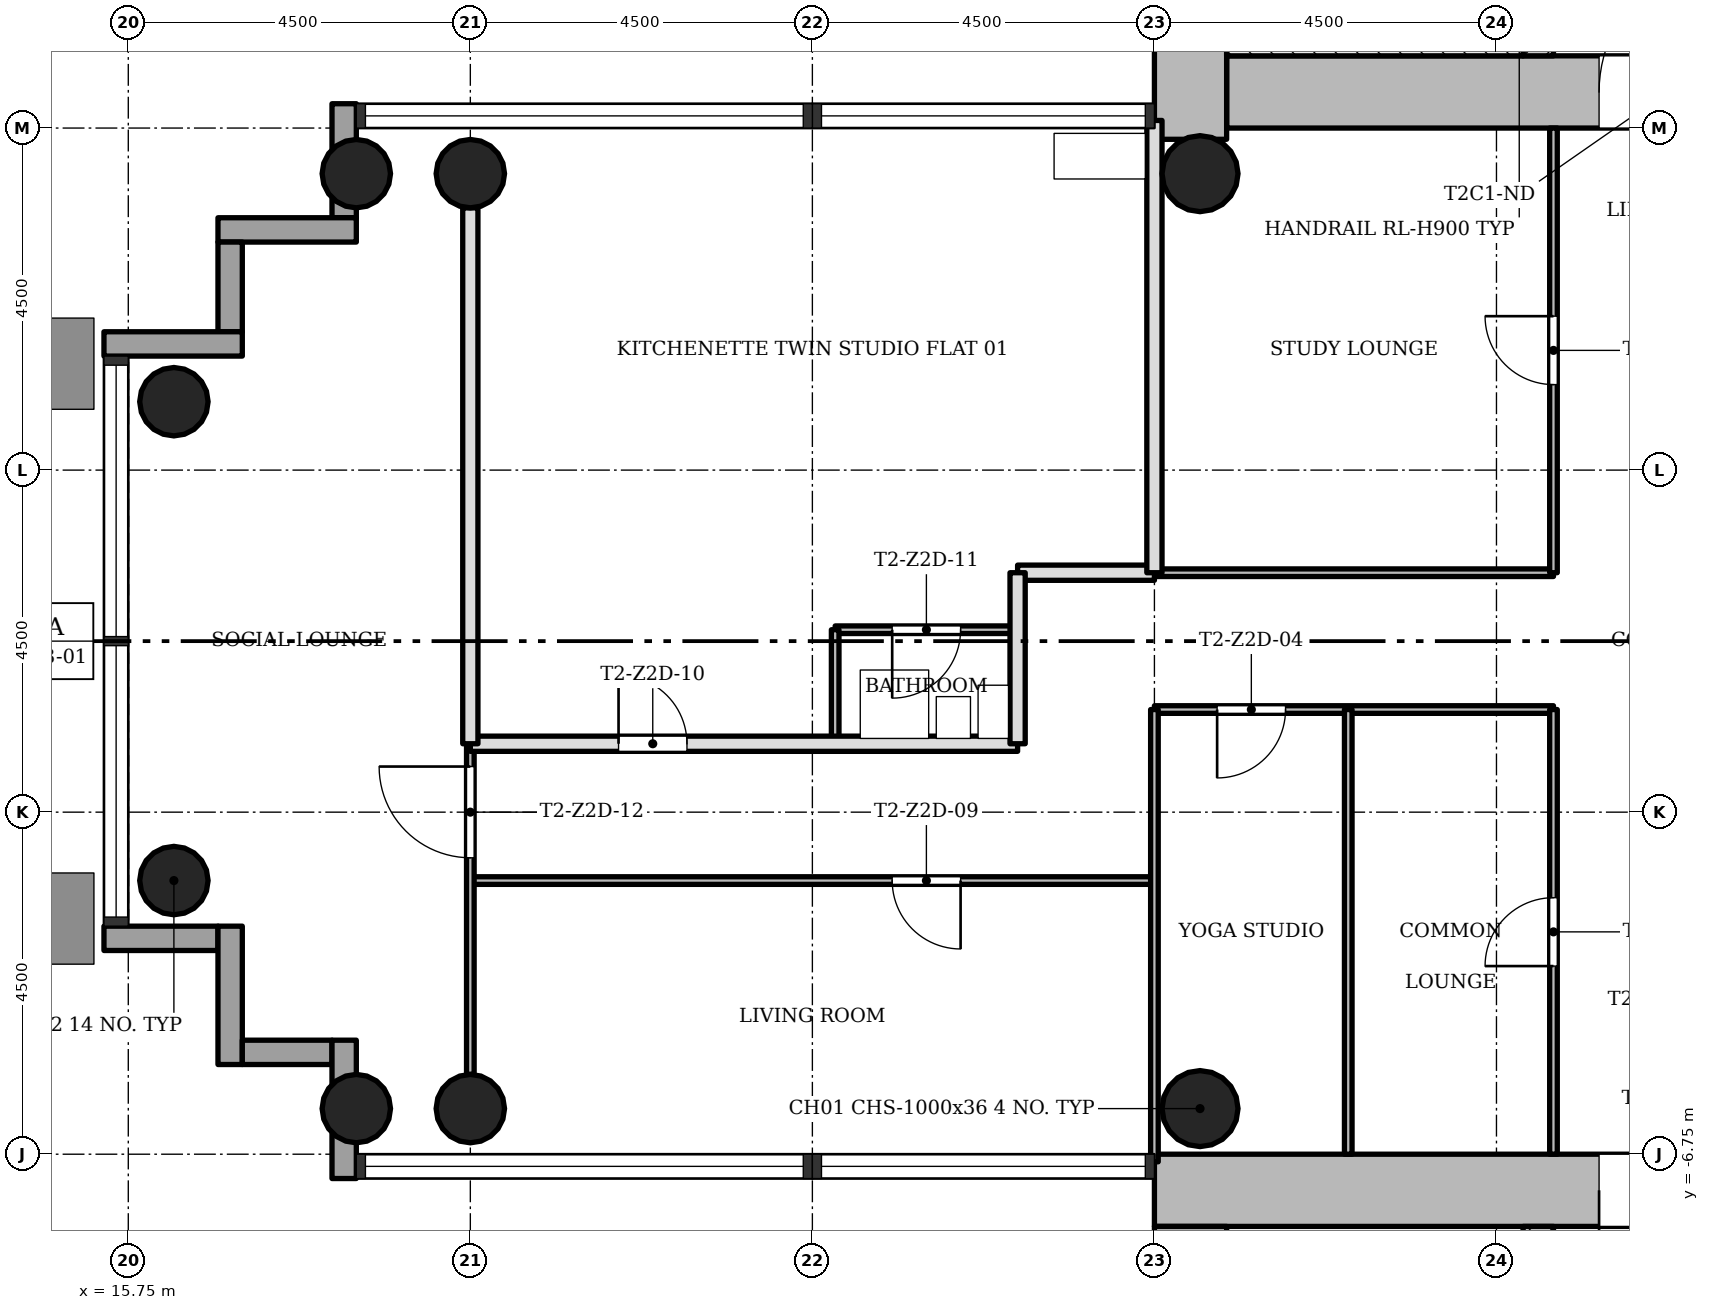
"""IFC4 building model, lengths in metres.
Left out: names, types, materials, properties, quantities, classifications, styles, units other than length and angle.
Written with IfcOpenShell. Run it as: python <this file> out.ifc"""

import sys

from ifc_helpers import new_model, si_unit, direction, frame, frame_2d, origin, origin_2d, place, context, subcontext, project, spatial, rectangle, hollow_circle, extrude, element, fill, save


model = new_model("IFC4")
c1 = context("Model", 3, precision=1e-05, world=origin(), true_north=direction((0.0, 1.0)))
c2 = subcontext(c1, "Body", "Model", "MODEL_VIEW")
j1 = project(units=[si_unit("LENGTHUNIT", "METRE"), si_unit("PLANEANGLEUNIT", "RADIAN")], contexts=[c1])
p1 = place(None, origin())
s1 = spatial("IfcSite", under=j1, at=p1, CompositionType="ELEMENT")
p2 = place(p1, origin())
s2 = spatial("IfcBuilding", under=s1, at=p2, CompositionType="ELEMENT")
p3 = place(p2, frame((0.0, 0.0, 120.8)))
s3 = spatial("IfcBuildingStorey", under=s2, at=p3, CompositionType="ELEMENT", Elevation=120.8)
p4 = place(p3, frame((30.2, 7.225, 0.0), z_axis=(0.0, 0.0, 1.0), x_axis=(1.0, 0.0, 0.0)))
e1 = element("IfcWall", 1, at=p4, inside=s3, PredefinedType="SHEAR", context=c2, shape_type="SweptSolid", body=[
    extrude(rectangle(XDim=12.55, YDim=0.95, at=frame_2d((6.275, 0.0))), origin(), (0.0, 0.0, 1.0), 3.4),
])
p5 = place(p4, frame((4.9, 0.0, 0.0)))
e2 = element("IfcOpeningElement", 2, at=p5, cuts=e1, PredefinedType="OPENING", context=c2, shape_type="SweptSolid", body=[
    extrude(rectangle(XDim=1.8, YDim=2.1, at=frame_2d((0.9, 1.05))), frame((0.0, 0.485, 0.0), z_axis=(0.0, -1.0, 0.0), x_axis=(1.0, 0.0, 0.0)), (0.0, 0.0, 1.0), 0.97),
])
p6 = place(p3, frame((29.725, 15.298, 0.0), z_axis=(0.0, 0.0, 1.0), x_axis=(0.0, -1.0, 0.0)))
e3 = element("IfcWall", 3, at=p6, inside=s3, PredefinedType="SHEAR", context=c2, shape_type="SweptSolid", body=[
    extrude(rectangle(XDim=8.696, YDim=0.95, at=frame_2d((4.348, 0.0))), origin(), (0.0, 0.0, 1.0), 3.4),
])
p7 = place(p3, frame((34.3, 7.7, 0.0), z_axis=(0.0, 0.0, 1.0), x_axis=(0.0, 1.0, 0.0)))
e4 = element("IfcWall", 4, at=p7, inside=s3, PredefinedType="SHEAR", context=c2, shape_type="SweptSolid", body=[
    extrude(rectangle(XDim=7.1, YDim=0.4, at=frame_2d((3.55, 0.0))), origin(), (0.0, 0.0, 1.0), 3.4),
])
p8 = place(p7, frame((0.7, 0.0, 0.0)))
e5 = element("IfcOpeningElement", 5, at=p8, cuts=e4, PredefinedType="OPENING", context=c2, shape_type="SweptSolid", body=[
    extrude(rectangle(XDim=0.9, YDim=2.1, at=frame_2d((0.45, 1.05))), frame((0.0, 0.21, 0.0), z_axis=(0.0, -1.0, 0.0), x_axis=(1.0, 0.0, 0.0)), (0.0, 0.0, 1.0), 0.42),
])
p9 = place(p3, frame((41.8, -7.225, 0.0), z_axis=(0.0, 0.0, 1.0), x_axis=(-1.0, 0.0, 0.0)))
e6 = element("IfcWall", 6, at=p9, inside=s3, PredefinedType="SHEAR", context=c2, shape_type="SweptSolid", body=[
    extrude(rectangle(XDim=12.55, YDim=0.95, at=frame_2d((6.275, 0.0))), origin(), (0.0, 0.0, 1.0), 3.4),
])
p10 = place(p9, frame((4.9, 0.0, 0.0)))
e7 = element("IfcOpeningElement", 7, at=p10, cuts=e6, PredefinedType="OPENING", context=c2, shape_type="SweptSolid", body=[
    extrude(rectangle(XDim=1.8, YDim=2.1, at=frame_2d((0.9, 1.05))), frame((0.0, 0.485, 0.0), z_axis=(0.0, -1.0, 0.0), x_axis=(1.0, 0.0, 0.0)), (0.0, 0.0, 1.0), 0.97),
])
p11 = place(p3, frame((29.725, -7.7, 0.0), z_axis=(0.0, 0.0, 1.0), x_axis=(0.0, -1.0, 0.0)))
e8 = element("IfcWall", 8, at=p11, inside=s3, PredefinedType="SHEAR", context=c2, shape_type="SweptSolid", body=[
    extrude(rectangle(XDim=8.05, YDim=0.95, at=frame_2d((4.025, 0.0))), origin(), (0.0, 0.0, 1.0), 3.4),
])
p12 = place(p3, frame((34.3, -14.8, 0.0), z_axis=(0.0, 0.0, 1.0), x_axis=(0.0, 1.0, 0.0)))
e9 = element("IfcWall", 9, at=p12, inside=s3, PredefinedType="SHEAR", context=c2, shape_type="SweptSolid", body=[
    extrude(rectangle(XDim=7.1, YDim=0.4, at=frame_2d((3.55, 0.0))), origin(), (0.0, 0.0, 1.0), 3.4),
])
p13 = place(p12, frame((5.2, 0.0, 0.0)))
e10 = element("IfcOpeningElement", 10, at=p13, cuts=e9, PredefinedType="OPENING", context=c2, shape_type="SweptSolid", body=[
    extrude(rectangle(XDim=1.1, YDim=2.1, at=frame_2d((0.55, 1.05))), frame((0.0, 0.21, 0.0), z_axis=(0.0, -1.0, 0.0), x_axis=(1.0, 0.0, 0.0)), (0.0, 0.0, 1.0), 0.42),
])
for number, where, z_axis, x_axis in (
    (11, (20.25, 6.15, 0.0), (0.0, 0.0, 1.0), (1.0, 0.0, 0.0)),
    (12, (20.25, -6.15, 0.0), (0.0, 0.0, 1.0), (1.0, 0.0, 0.0)),
    (13, (18.75, 6.15, 0.0), (0.0, 0.0, 1.0), (1.0, 0.0, 0.0)),
    (14, (18.75, -6.15, 0.0), (0.0, 0.0, 1.0), (1.0, 0.0, 0.0)),
    (15, (16.35, 3.15, 0.0), (0.0, 0.0, 1.0), (1.0, 0.0, 0.0)),
    (16, (16.35, -3.15, 0.0), (0.0, 0.0, 1.0), (1.0, 0.0, 0.0)),
):
    element("IfcColumn", number, at=place(p3, frame(where, z_axis=z_axis, x_axis=x_axis)), inside=s3, PredefinedType="COLUMN", context=c2, shape_type="SweptSolid", body=[
        extrude(hollow_circle(Radius=0.45, WallThickness=0.032, at=origin_2d()), origin(), (0.0, 0.0, 1.0), 3.4),
    ])
for number, where, z_axis, x_axis in (
    (17, (29.85, 6.15, 0.0), (0.0, 0.0, 1.0), (1.0, 0.0, 0.0)),
    (18, (29.85, -6.15, 0.0), (0.0, 0.0, 1.0), (1.0, 0.0, 0.0)),
):
    element("IfcColumn", number, at=place(p3, frame(where, z_axis=z_axis, x_axis=x_axis)), inside=s3, PredefinedType="COLUMN", context=c2, shape_type="SweptSolid", body=[
        extrude(hollow_circle(Radius=0.5, WallThickness=0.036, at=origin_2d()), origin(), (0.0, 0.0, 1.0), 3.4),
    ])
p14 = place(p3, frame((18.59, 7.07, -0.3), z_axis=(0.0, 0.0, 1.0), x_axis=(0.0, -1.0, 0.0)))
e19 = element("IfcWall", 19, at=p14, inside=s3, PredefinedType="STANDARD", context=c2, shape_type="SweptSolid", body=[
    extrude(rectangle(XDim=1.5, YDim=0.32, at=frame_2d((0.75, 0.0))), origin(), (0.0, 0.0, 1.0), 3.4),
])
p15 = place(p3, frame((18.75, 5.41, -0.3), z_axis=(0.0, 0.0, 1.0), x_axis=(-1.0, 0.0, 0.0)))
e20 = element("IfcWall", 20, at=p15, inside=s3, PredefinedType="STANDARD", context=c2, shape_type="SweptSolid", body=[
    extrude(rectangle(XDim=1.82, YDim=0.32, at=frame_2d((0.91, 0.0))), origin(), (0.0, 0.0, 1.0), 3.4),
])
p16 = place(p3, frame((17.09, 5.25, -0.3), z_axis=(0.0, 0.0, 1.0), x_axis=(0.0, -1.0, 0.0)))
e21 = element("IfcWall", 21, at=p16, inside=s3, PredefinedType="STANDARD", context=c2, shape_type="SweptSolid", body=[
    extrude(rectangle(XDim=1.18, YDim=0.32, at=frame_2d((0.59, 0.0))), origin(), (0.0, 0.0, 1.0), 3.4),
])
p17 = place(p3, frame((17.25, 3.91, -0.3), z_axis=(0.0, 0.0, 1.0), x_axis=(-1.0, 0.0, 0.0)))
e22 = element("IfcWall", 22, at=p17, inside=s3, PredefinedType="STANDARD", context=c2, shape_type="SweptSolid", body=[
    extrude(rectangle(XDim=1.82, YDim=0.32, at=frame_2d((0.91, 0.0))), origin(), (0.0, 0.0, 1.0), 3.4),
])
p18 = place(p3, frame((15.43, -3.91, -0.3), z_axis=(0.0, 0.0, 1.0), x_axis=(1.0, 0.0, 0.0)))
e23 = element("IfcWall", 23, at=p18, inside=s3, PredefinedType="STANDARD", context=c2, shape_type="SweptSolid", body=[
    extrude(rectangle(XDim=1.5, YDim=0.32, at=frame_2d((0.75, 0.0))), origin(), (0.0, 0.0, 1.0), 3.4),
])
p19 = place(p3, frame((17.09, -3.75, -0.3), z_axis=(0.0, 0.0, 1.0), x_axis=(0.0, -1.0, 0.0)))
e24 = element("IfcWall", 24, at=p19, inside=s3, PredefinedType="STANDARD", context=c2, shape_type="SweptSolid", body=[
    extrude(rectangle(XDim=1.82, YDim=0.32, at=frame_2d((0.91, 0.0))), origin(), (0.0, 0.0, 1.0), 3.4),
])
p20 = place(p3, frame((17.25, -5.41, -0.3), z_axis=(0.0, 0.0, 1.0), x_axis=(1.0, 0.0, 0.0)))
e25 = element("IfcWall", 25, at=p20, inside=s3, PredefinedType="STANDARD", context=c2, shape_type="SweptSolid", body=[
    extrude(rectangle(XDim=1.18, YDim=0.32, at=frame_2d((0.59, 0.0))), origin(), (0.0, 0.0, 1.0), 3.4),
])
p21 = place(p3, frame((18.59, -5.25, -0.3), z_axis=(0.0, 0.0, 1.0), x_axis=(0.0, -1.0, 0.0)))
e26 = element("IfcWall", 26, at=p21, inside=s3, PredefinedType="STANDARD", context=c2, shape_type="SweptSolid", body=[
    extrude(rectangle(XDim=1.82, YDim=0.32, at=frame_2d((0.91, 0.0))), origin(), (0.0, 0.0, 1.0), 3.4),
])
p22 = place(p3, frame((29.25, -3.15, 0.0), z_axis=(0.0, 0.0, 1.0), x_axis=(-1.0, 0.0, 0.0)))
e27 = element("IfcWall", 27, at=p22, inside=s3, PredefinedType="PARTITIONING", context=c2, shape_type="SweptSolid", body=[
    extrude(rectangle(XDim=9.0, YDim=0.1, at=frame_2d((4.5, 0.0))), origin(), (0.0, 0.0, 1.0), 3.0),
])
p23 = place(p22, frame((2.55, 0.0, 0.0)))
e28 = element("IfcOpeningElement", 28, at=p23, cuts=e27, PredefinedType="OPENING", context=c2, shape_type="SweptSolid", body=[
    extrude(rectangle(XDim=0.9, YDim=2.1, at=frame_2d((0.45, 1.05))), frame((0.0, 0.06, 0.0), z_axis=(0.0, -1.0, 0.0), x_axis=(1.0, 0.0, 0.0)), (0.0, 0.0, 1.0), 0.12),
])
p24 = place(p3, frame((27.45, -1.35, 0.0), z_axis=(0.0, 0.0, 1.0), x_axis=(-1.0, 0.0, 0.0)))
e29 = element("IfcWall", 29, at=p24, inside=s3, PredefinedType="SOLIDWALL", context=c2, shape_type="SweptSolid", body=[
    extrude(rectangle(XDim=7.2, YDim=0.2, at=frame_2d((3.6, 0.0))), origin(), (0.0, 0.0, 1.0), 3.0),
])
p25 = place(p24, frame((4.35, 0.0, 0.0)))
e30 = element("IfcOpeningElement", 30, at=p25, cuts=e29, PredefinedType="OPENING", context=c2, shape_type="SweptSolid", body=[
    extrude(rectangle(XDim=0.9, YDim=2.1, at=frame_2d((0.45, 1.05))), frame((0.0, 0.11, 0.0), z_axis=(0.0, -1.0, 0.0), x_axis=(1.0, 0.0, 0.0)), (0.0, 0.0, 1.0), 0.22),
])
p26 = place(p3, frame((34.5, -0.9, 0.0), z_axis=(0.0, 0.0, 1.0), x_axis=(-1.0, 0.0, 0.0)))
e31 = element("IfcWall", 31, at=p26, inside=s3, PredefinedType="PARTITIONING", context=c2, shape_type="SweptSolid", body=[
    extrude(rectangle(XDim=5.25, YDim=0.1, at=frame_2d((2.625, 0.0))), origin(), (0.0, 0.0, 1.0), 3.0),
])
p27 = place(p26, frame((3.525, 0.0, 0.0)))
e32 = element("IfcOpeningElement", 32, at=p27, cuts=e31, PredefinedType="OPENING", context=c2, shape_type="SweptSolid", body=[
    extrude(rectangle(XDim=0.9, YDim=2.1, at=frame_2d((0.45, 1.05))), frame((0.0, 0.06, 0.0), z_axis=(0.0, -1.0, 0.0), x_axis=(1.0, 0.0, 0.0)), (0.0, 0.0, 1.0), 0.12),
])
p28 = place(p3, frame((27.45, 0.15, 0.0), z_axis=(0.0, 0.0, 1.0), x_axis=(-1.0, 0.0, 0.0)))
e33 = element("IfcWall", 33, at=p28, inside=s3, PredefinedType="PARTITIONING", context=c2, shape_type="SweptSolid", body=[
    extrude(rectangle(XDim=2.4, YDim=0.1, at=frame_2d((1.2, 0.0))), origin(), (0.0, 0.0, 1.0), 3.0),
])
p29 = place(p28, frame((0.75, 0.0, 0.0)))
e34 = element("IfcOpeningElement", 34, at=p29, cuts=e33, PredefinedType="OPENING", context=c2, shape_type="SweptSolid", body=[
    extrude(rectangle(XDim=0.9, YDim=2.1, at=frame_2d((0.45, 1.05))), frame((0.0, 0.06, 0.0), z_axis=(0.0, -1.0, 0.0), x_axis=(1.0, 0.0, 0.0)), (0.0, 0.0, 1.0), 0.12),
])
p30 = place(p3, frame((34.5, 0.9, 0.0), z_axis=(0.0, 0.0, 1.0), x_axis=(-1.0, 0.0, 0.0)))
e35 = element("IfcWall", 35, at=p30, inside=s3, PredefinedType="PARTITIONING", context=c2, shape_type="SweptSolid", body=[
    extrude(rectangle(XDim=5.25, YDim=0.1, at=frame_2d((2.625, 0.0))), origin(), (0.0, 0.0, 1.0), 3.0),
])
p31 = place(p3, frame((29.25, 0.9, 0.0), z_axis=(0.0, 0.0, 1.0), x_axis=(-1.0, 0.0, 0.0)))
e36 = element("IfcWall", 36, at=p31, inside=s3, PredefinedType="SOLIDWALL", context=c2, shape_type="SweptSolid", body=[
    extrude(rectangle(XDim=1.8, YDim=0.2, at=frame_2d((0.9, 0.0))), origin(), (0.0, 0.0, 1.0), 3.0),
])
p32 = place(p3, frame((34.5, -6.75, 0.0), z_axis=(0.0, 0.0, 1.0), x_axis=(0.0, 1.0, 0.0)))
e37 = element("IfcWall", 37, at=p32, inside=s3, PredefinedType="PARTITIONING", context=c2, shape_type="SweptSolid", body=[
    extrude(rectangle(XDim=5.85, YDim=0.1, at=frame_2d((2.925, 0.0))), origin(), (0.0, 0.0, 1.0), 3.0),
])
p33 = place(p32, frame((2.475, 0.0, 0.0)))
e38 = element("IfcOpeningElement", 38, at=p33, cuts=e37, PredefinedType="OPENING", context=c2, shape_type="SweptSolid", body=[
    extrude(rectangle(XDim=0.9, YDim=2.1, at=frame_2d((0.45, 1.05))), frame((0.0, 0.06, 0.0), z_axis=(0.0, -1.0, 0.0), x_axis=(1.0, 0.0, 0.0)), (0.0, 0.0, 1.0), 0.12),
])
p34 = place(p3, frame((34.5, 0.9, 0.0), z_axis=(0.0, 0.0, 1.0), x_axis=(0.0, 1.0, 0.0)))
e39 = element("IfcWall", 39, at=p34, inside=s3, PredefinedType="PARTITIONING", context=c2, shape_type="SweptSolid", body=[
    extrude(rectangle(XDim=5.85, YDim=0.1, at=frame_2d((2.925, 0.0))), origin(), (0.0, 0.0, 1.0), 3.0),
])
p35 = place(p34, frame((2.475, 0.0, 0.0)))
e40 = element("IfcOpeningElement", 40, at=p35, cuts=e39, PredefinedType="OPENING", context=c2, shape_type="SweptSolid", body=[
    extrude(rectangle(XDim=0.9, YDim=2.1, at=frame_2d((0.45, 1.05))), frame((0.0, 0.06, 0.0), z_axis=(0.0, -1.0, 0.0), x_axis=(1.0, 0.0, 0.0)), (0.0, 0.0, 1.0), 0.12),
])
p36 = place(p3, frame((31.8, -6.75, 0.0), z_axis=(0.0, 0.0, 1.0), x_axis=(0.0, 1.0, 0.0)))
e41 = element("IfcWall", 41, at=p36, inside=s3, PredefinedType="PARTITIONING", context=c2, shape_type="SweptSolid", body=[
    extrude(rectangle(XDim=5.85, YDim=0.1, at=frame_2d((2.925, 0.0))), origin(), (0.0, 0.0, 1.0), 3.0),
])
p37 = place(p3, frame((29.25, -6.85, 0.0), z_axis=(0.0, 0.0, 1.0), x_axis=(0.0, 1.0, 0.0)))
e42 = element("IfcWall", 42, at=p37, inside=s3, PredefinedType="PARTITIONING", context=c2, shape_type="SweptSolid", body=[
    extrude(rectangle(XDim=5.95, YDim=0.1, at=frame_2d((2.975, 0.0))), origin(), (0.0, 0.0, 1.0), 3.0),
])
p38 = place(p3, frame((29.25, 0.9, 0.0), z_axis=(0.0, 0.0, 1.0), x_axis=(0.0, 1.0, 0.0)))
e43 = element("IfcWall", 43, at=p38, inside=s3, PredefinedType="SOLIDWALL", context=c2, shape_type="SweptSolid", body=[
    extrude(rectangle(XDim=5.95, YDim=0.2, at=frame_2d((2.975, 0.0))), origin(), (0.0, 0.0, 1.0), 3.0),
])
p39 = place(p3, frame((27.45, -1.35, 0.0), z_axis=(0.0, 0.0, 1.0), x_axis=(0.0, 1.0, 0.0)))
e44 = element("IfcWall", 44, at=p39, inside=s3, PredefinedType="SOLIDWALL", context=c2, shape_type="SweptSolid", body=[
    extrude(rectangle(XDim=2.25, YDim=0.2, at=frame_2d((1.125, 0.0))), origin(), (0.0, 0.0, 1.0), 3.0),
])
p40 = place(p3, frame((25.05, -1.35, 0.0), z_axis=(0.0, 0.0, 1.0), x_axis=(0.0, 1.0, 0.0)))
e45 = element("IfcWall", 45, at=p40, inside=s3, PredefinedType="PARTITIONING", context=c2, shape_type="SweptSolid", body=[
    extrude(rectangle(XDim=1.5, YDim=0.1, at=frame_2d((0.75, 0.0))), origin(), (0.0, 0.0, 1.0), 3.0),
])
p41 = place(p3, frame((20.25, -5.7, 0.0), z_axis=(0.0, 0.0, 1.0), x_axis=(0.0, 1.0, 0.0)))
e46 = element("IfcWall", 46, at=p41, inside=s3, PredefinedType="PARTITIONING", context=c2, shape_type="SweptSolid", body=[
    extrude(rectangle(XDim=4.35, YDim=0.1, at=frame_2d((2.175, 0.0))), origin(), (0.0, 0.0, 1.0), 3.0),
])
p42 = place(p41, frame((2.85, 0.0, 0.0)))
e47 = element("IfcOpeningElement", 47, at=p42, cuts=e46, PredefinedType="OPENING", context=c2, shape_type="SweptSolid", body=[
    extrude(rectangle(XDim=1.2, YDim=2.1, at=frame_2d((0.6, 1.05))), frame((0.0, 0.06, 0.0), z_axis=(0.0, -1.0, 0.0), x_axis=(1.0, 0.0, 0.0)), (0.0, 0.0, 1.0), 0.12),
])
p43 = place(p3, frame((20.25, -1.35, 0.0), z_axis=(0.0, 0.0, 1.0), x_axis=(0.0, 1.0, 0.0)))
e48 = element("IfcWall", 48, at=p43, inside=s3, PredefinedType="SOLIDWALL", context=c2, shape_type="SweptSolid", body=[
    extrude(rectangle(XDim=7.05, YDim=0.2, at=frame_2d((3.525, 0.0))), origin(), (0.0, 0.0, 1.0), 3.0),
])
p44 = place(p3, frame((34.1, 7.825, 0.0), z_axis=(0.0, 0.0, 1.0), x_axis=(-1.0, 0.0, 0.0)))
e49 = element("IfcWall", 49, at=p44, inside=s3, PredefinedType="SHEAR", context=c2, shape_type="SweptSolid", body=[
    extrude(rectangle(XDim=3.9, YDim=0.25, at=frame_2d((1.95, 0.0))), origin(), (0.0, 0.0, 1.0), 3.4),
])
p45 = place(p35, origin())
e50 = element("IfcDoor", 50, at=p45, inside=s3, OperationType="SINGLE_SWING_LEFT", PredefinedType="DOOR", context=c2, shape_type="SweptSolid", body=[
    extrude(rectangle(XDim=0.9, YDim=2.1, at=frame_2d((0.45, 1.05))), frame((0.0, 0.025, 0.0), z_axis=(0.0, -1.0, 0.0), x_axis=(1.0, 0.0, 0.0)), (0.0, 0.0, 1.0), 0.05),
])
fill(e40, e50)
p46 = place(p33, origin())
e51 = element("IfcDoor", 51, at=p46, inside=s3, OperationType="SINGLE_SWING_RIGHT", PredefinedType="DOOR", context=c2, shape_type="SweptSolid", body=[
    extrude(rectangle(XDim=0.9, YDim=2.1, at=frame_2d((0.45, 1.05))), frame((0.0, 0.025, 0.0), z_axis=(0.0, -1.0, 0.0), x_axis=(1.0, 0.0, 0.0)), (0.0, 0.0, 1.0), 0.05),
])
fill(e38, e51)
p47 = place(p27, origin())
e52 = element("IfcDoor", 52, at=p47, inside=s3, OperationType="SINGLE_SWING_LEFT", PredefinedType="DOOR", context=c2, shape_type="SweptSolid", body=[
    extrude(rectangle(XDim=0.9, YDim=2.1, at=frame_2d((0.45, 1.05))), frame((0.0, 0.025, 0.0), z_axis=(0.0, -1.0, 0.0), x_axis=(1.0, 0.0, 0.0)), (0.0, 0.0, 1.0), 0.05),
])
fill(e32, e52)
p48 = place(p23, origin())
e53 = element("IfcDoor", 53, at=p48, inside=s3, OperationType="SINGLE_SWING_RIGHT", PredefinedType="DOOR", context=c2, shape_type="SweptSolid", body=[
    extrude(rectangle(XDim=0.9, YDim=2.1, at=frame_2d((0.45, 1.05))), frame((0.0, 0.025, 0.0), z_axis=(0.0, -1.0, 0.0), x_axis=(1.0, 0.0, 0.0)), (0.0, 0.0, 1.0), 0.05),
])
fill(e28, e53)
p49 = place(p25, origin())
e54 = element("IfcDoor", 54, at=p49, inside=s3, OperationType="SINGLE_SWING_RIGHT", PredefinedType="DOOR", context=c2, shape_type="SweptSolid", body=[
    extrude(rectangle(XDim=0.9, YDim=2.1, at=frame_2d((0.45, 1.05))), frame((0.0, 0.025, 0.0), z_axis=(0.0, -1.0, 0.0), x_axis=(1.0, 0.0, 0.0)), (0.0, 0.0, 1.0), 0.05),
])
fill(e30, e54)
p50 = place(p29, origin())
e55 = element("IfcDoor", 55, at=p50, inside=s3, OperationType="SINGLE_SWING_LEFT", PredefinedType="DOOR", context=c2, shape_type="SweptSolid", body=[
    extrude(rectangle(XDim=0.9, YDim=2.1, at=frame_2d((0.45, 1.05))), frame((0.0, 0.025, 0.0), z_axis=(0.0, -1.0, 0.0), x_axis=(1.0, 0.0, 0.0)), (0.0, 0.0, 1.0), 0.05),
])
fill(e34, e55)
p51 = place(p42, origin())
e56 = element("IfcDoor", 56, at=p51, inside=s3, OperationType="SINGLE_SWING_LEFT", PredefinedType="DOOR", context=c2, shape_type="SweptSolid", body=[
    extrude(rectangle(XDim=1.2, YDim=2.1, at=frame_2d((0.6, 1.05))), frame((0.0, 0.025, 0.0), z_axis=(0.0, -1.0, 0.0), x_axis=(1.0, 0.0, 0.0)), (0.0, 0.0, 1.0), 0.05),
])
fill(e47, e56)
p52 = place(p5, origin())
e57 = element("IfcDoor", 57, at=p52, inside=s3, OperationType="SINGLE_SWING_LEFT", PredefinedType="DOOR", context=c2, shape_type="SweptSolid", body=[
    extrude(rectangle(XDim=1.8, YDim=2.1, at=frame_2d((0.9, 1.05))), frame((0.0, 0.025, 0.0), z_axis=(0.0, -1.0, 0.0), x_axis=(1.0, 0.0, 0.0)), (0.0, 0.0, 1.0), 0.05),
])
fill(e2, e57)
p53 = place(p10, origin())
e58 = element("IfcDoor", 58, at=p53, inside=s3, OperationType="SINGLE_SWING_LEFT", PredefinedType="DOOR", context=c2, shape_type="SweptSolid", body=[
    extrude(rectangle(XDim=1.8, YDim=2.1, at=frame_2d((0.9, 1.05))), frame((0.0, 0.025, 0.0), z_axis=(0.0, -1.0, 0.0), x_axis=(1.0, 0.0, 0.0)), (0.0, 0.0, 1.0), 0.05),
])
fill(e7, e58)
save(model, sys.argv[1])
